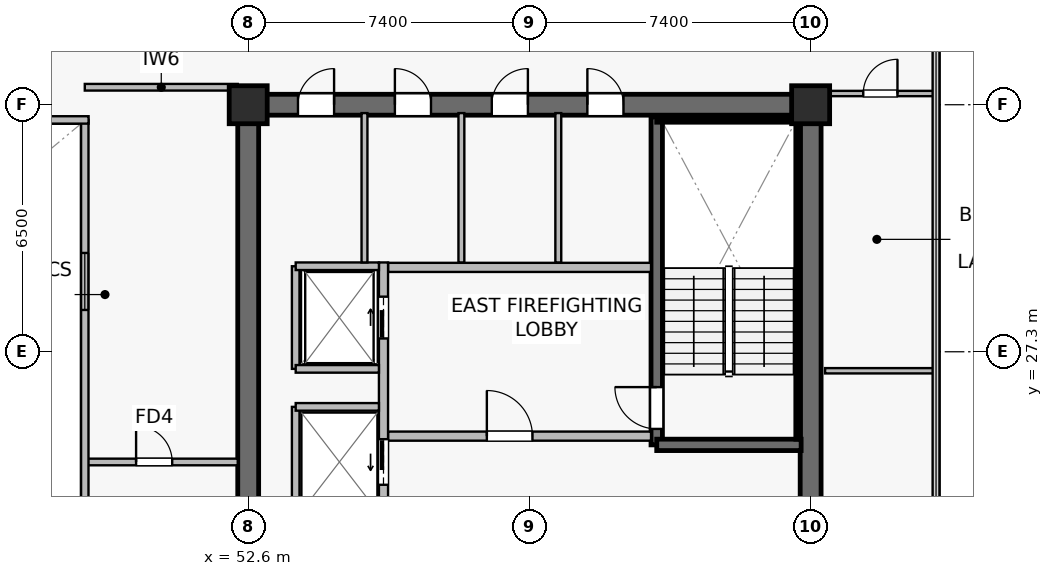
"""IFC4 building model, lengths in metres.
Left out: names, types, materials, properties, quantities, classifications, styles, units other than length and angle.
Written with IfcOpenShell. Run it as: python <this file> out.ifc"""

import sys

from ifc_helpers import new_model, si_unit, direction, frame, frame_2d, origin, origin_2d, place, context, subcontext, project, spatial, rectangle, extrude, source, transform, mapped, element, fill, save


model = new_model("IFC4")
c1 = context("Model", 3, precision=1e-05, world=origin(), true_north=direction((0.0, 1.0)))
c2 = subcontext(c1, "Body", "Model", "MODEL_VIEW")
j1 = project(units=[si_unit("LENGTHUNIT", "METRE"), si_unit("PLANEANGLEUNIT", "RADIAN")], contexts=[c1])
p1 = place(None, origin())
s1 = spatial("IfcSite", under=j1, at=p1, CompositionType="ELEMENT")
p2 = place(p1, origin())
s2 = spatial("IfcBuilding", under=s1, at=p2, CompositionType="ELEMENT")
p3 = place(p2, frame((0.0, 0.0, 258.8)))
s3 = spatial("IfcBuildingStorey", under=s2, at=p3, CompositionType="ELEMENT", Elevation=258.8)
p4 = place(p3, frame((52.325, 33.8, 0.0), z_axis=(0.0, 0.0, 1.0), x_axis=(1.0, 0.0, 0.0)))
e1 = element("IfcWall", 1, at=p4, inside=s3, PredefinedType="SHEAR", context=c2, shape_type="SweptSolid", body=[
    extrude(rectangle(XDim=15.35, YDim=0.55, at=frame_2d((7.675, 0.0))), origin(), (0.0, 0.0, 1.0), 3.8),
])
p5 = place(p4, frame((9.2, 0.0, 0.0)))
e2 = element("IfcOpeningElement", 2, at=p5, cuts=e1, PredefinedType="OPENING", context=c2, shape_type="SweptSolid", body=[
    extrude(rectangle(XDim=0.95, YDim=2.15, at=frame_2d((0.475, 1.075))), frame((0.0, 0.285, 0.0), z_axis=(0.0, -1.0, 0.0), x_axis=(1.0, 0.0, 0.0)), (0.0, 0.0, 1.0), 0.57),
])
p6 = place(p4, frame((6.685, 0.0, 0.0)))
e3 = element("IfcOpeningElement", 3, at=p6, cuts=e1, PredefinedType="OPENING", context=c2, shape_type="SweptSolid", body=[
    extrude(rectangle(XDim=0.95, YDim=2.15, at=frame_2d((0.475, 1.075))), frame((0.0, 0.285, 0.0), z_axis=(0.0, -1.0, 0.0), x_axis=(1.0, 0.0, 0.0)), (0.0, 0.0, 1.0), 0.57),
])
p7 = place(p4, frame((4.135, 0.0, 0.0)))
e4 = element("IfcOpeningElement", 4, at=p7, cuts=e1, PredefinedType="OPENING", context=c2, shape_type="SweptSolid", body=[
    extrude(rectangle(XDim=0.95, YDim=2.15, at=frame_2d((0.475, 1.075))), frame((0.0, 0.285, 0.0), z_axis=(0.0, -1.0, 0.0), x_axis=(1.0, 0.0, 0.0)), (0.0, 0.0, 1.0), 0.57),
])
p8 = place(p4, frame((1.585, 0.0, 0.0)))
e5 = element("IfcOpeningElement", 5, at=p8, cuts=e1, PredefinedType="OPENING", context=c2, shape_type="SweptSolid", body=[
    extrude(rectangle(XDim=0.95, YDim=2.15, at=frame_2d((0.475, 1.075))), frame((0.0, 0.285, 0.0), z_axis=(0.0, -1.0, 0.0), x_axis=(1.0, 0.0, 0.0)), (0.0, 0.0, 1.0), 0.57),
])
p9 = place(p3, frame((52.6, 15.075, 0.0), z_axis=(0.0, 0.0, 1.0), x_axis=(0.0, 1.0, 0.0)))
e6 = element("IfcWall", 6, at=p9, inside=s3, PredefinedType="SHEAR", context=c2, shape_type="SweptSolid", body=[
    extrude(rectangle(XDim=18.45, YDim=0.55, at=frame_2d((9.225, 0.0))), origin(), (0.0, 0.0, 1.0), 3.8),
])
p10 = place(p9, frame((3.475, 0.0, 0.0)))
e7 = element("IfcOpeningElement", 7, at=p10, cuts=e6, PredefinedType="OPENING", context=c2, shape_type="SweptSolid", body=[
    extrude(rectangle(XDim=1.42, YDim=2.2, at=frame_2d((0.71, 1.1))), frame((0.0, 0.285, 0.0), z_axis=(0.0, -1.0, 0.0), x_axis=(1.0, 0.0, 0.0)), (0.0, 0.0, 1.0), 0.57),
])
p11 = place(p3, frame((67.4, 15.075, 0.0), z_axis=(0.0, 0.0, 1.0), x_axis=(0.0, 1.0, 0.0)))
e8 = element("IfcWall", 8, at=p11, inside=s3, PredefinedType="SHEAR", context=c2, shape_type="SweptSolid", body=[
    extrude(rectangle(XDim=18.45, YDim=0.55, at=frame_2d((9.225, 0.0))), origin(), (0.0, 0.0, 1.0), 3.8),
])
p12 = place(p3, frame((63.35, 24.85, 0.0), z_axis=(0.0, 0.0, 1.0), x_axis=(0.0, 1.0, 0.0)))
e9 = element("IfcWall", 9, at=p12, inside=s3, PredefinedType="SHEAR", context=c2, shape_type="SweptSolid", body=[
    extrude(rectangle(XDim=8.63, YDim=0.3, at=frame_2d((4.315, 0.0))), origin(), (0.0, 0.0, 1.0), 3.8),
])
p13 = place(p12, frame((0.42, 0.0, 0.0)))
e10 = element("IfcOpeningElement", 10, at=p13, cuts=e9, PredefinedType="OPENING", context=c2, shape_type="SweptSolid", body=[
    extrude(rectangle(XDim=1.1, YDim=2.15, at=frame_2d((0.55, 1.075))), frame((0.0, 0.16, 0.0), z_axis=(0.0, -1.0, 0.0), x_axis=(1.0, 0.0, 0.0)), (0.0, 0.0, 1.0), 0.32),
])
p14 = place(p3, frame((63.35, 24.85, 0.0), z_axis=(0.0, 0.0, 1.0), x_axis=(1.0, 0.0, 0.0)))
e11 = element("IfcWall", 11, at=p14, inside=s3, PredefinedType="SHEAR", context=c2, shape_type="SweptSolid", body=[
    extrude(rectangle(XDim=3.8, YDim=0.3, at=frame_2d((1.9, 0.0))), origin(), (0.0, 0.0, 1.0), 3.8),
])
p15 = place(p3, frame((63.35, 33.4, 0.0), z_axis=(0.0, 0.0, 1.0), x_axis=(1.0, 0.0, 0.0)))
e12 = element("IfcWall", 12, at=p15, inside=s3, PredefinedType="SOLIDWALL", context=c2, shape_type="SweptSolid", body=[
    extrude(rectangle(XDim=3.72, YDim=0.12, at=frame_2d((1.86, 0.0))), origin(), (0.0, 0.0, 1.0), 3.8),
])
p16 = place(p3, frame((67.07, 25.0, 0.0), z_axis=(0.0, 0.0, 1.0), x_axis=(0.0, 1.0, 0.0)))
e13 = element("IfcWall", 13, at=p16, inside=s3, PredefinedType="SOLIDWALL", context=c2, shape_type="SweptSolid", body=[
    extrude(rectangle(XDim=8.32, YDim=0.12, at=frame_2d((4.16, 0.0))), origin(), (0.0, 0.0, 1.0), 3.8),
])
m1 = source(origin(), c2, "Body", "SweptSolid", [
    extrude(rectangle(XDim=1.0, YDim=1.0, at=origin_2d()), origin(), (0.0, 0.0, 1.0), 4.1),
])
for number, where, z_axis, x_axis in (
    (14, (52.6, 33.8, 0.0), (0.0, 0.0, 1.0), (1.0, 0.0, 0.0)),
    (15, (67.4, 33.8, 0.0), (0.0, 0.0, 1.0), (1.0, 0.0, 0.0)),
):
    element("IfcColumn", number, at=place(p3, frame(where, z_axis=z_axis, x_axis=x_axis)), inside=s3, PredefinedType="COLUMN", context=c2, shape_type="MappedRepresentation", body=[
        mapped(m1, transform((0.0, 0.0, 0.0), scale=1.0)),
    ])
p17 = place(p3, frame((56.28, 25.08, 0.0), z_axis=(0.0, 0.0, 1.0), x_axis=(1.0, 0.0, 0.0)))
e16 = element("IfcWall", 16, at=p17, inside=s3, PredefinedType="SOLIDWALL", context=c2, shape_type="SweptSolid", body=[
    extrude(rectangle(XDim=6.92, YDim=0.24, at=frame_2d((3.46, 0.0))), origin(), (0.0, 0.0, 1.0), 3.197),
])
p18 = place(p17, frame((2.6, 0.0, 0.0)))
e17 = element("IfcOpeningElement", 17, at=p18, cuts=e16, PredefinedType="OPENING", context=c2, shape_type="SweptSolid", body=[
    extrude(rectangle(XDim=1.2, YDim=2.16, at=frame_2d((0.6, 1.08))), frame((0.0, 0.13, 0.0), z_axis=(0.0, -1.0, 0.0), x_axis=(1.0, 0.0, 0.0)), (0.0, 0.0, 1.0), 0.26),
])
p19 = place(p3, frame((56.28, 29.52, 0.0), z_axis=(0.0, 0.0, 1.0), x_axis=(1.0, 0.0, 0.0)))
e18 = element("IfcWall", 18, at=p19, inside=s3, PredefinedType="SOLIDWALL", context=c2, shape_type="SweptSolid", body=[
    extrude(rectangle(XDim=6.92, YDim=0.24, at=frame_2d((3.46, 0.0))), origin(), (0.0, 0.0, 1.0), 3.197),
])
p20 = place(p3, frame((56.16, 22.8, 0.0), z_axis=(0.0, 0.0, 1.0), x_axis=(0.0, 1.0, 0.0)))
e19 = element("IfcWall", 19, at=p20, inside=s3, PredefinedType="SOLIDWALL", context=c2, shape_type="SweptSolid", body=[
    extrude(rectangle(XDim=6.85, YDim=0.24, at=frame_2d((3.425, 0.0))), origin(), (0.0, 0.0, 1.0), 2.935),
])
p21 = place(p20, frame((4.85, 0.0, 0.0)))
e20 = element("IfcOpeningElement", 20, at=p21, cuts=e19, PredefinedType="OPENING", context=c2, shape_type="SweptSolid", body=[
    extrude(rectangle(XDim=1.1, YDim=2.22, at=frame_2d((0.55, 1.11))), frame((0.0, 0.13, 0.0), z_axis=(0.0, -1.0, 0.0), x_axis=(1.0, 0.0, 0.0)), (0.0, 0.0, 1.0), 0.26),
])
p22 = place(p20, frame((1.0, 0.0, 0.0)))
e21 = element("IfcOpeningElement", 21, at=p22, cuts=e19, PredefinedType="OPENING", context=c2, shape_type="SweptSolid", body=[
    extrude(rectangle(XDim=1.2, YDim=2.22, at=frame_2d((0.6, 1.11))), frame((0.0, 0.13, 0.0), z_axis=(0.0, -1.0, 0.0), x_axis=(1.0, 0.0, 0.0)), (0.0, 0.0, 1.0), 0.26),
])
p23 = place(p3, frame((53.85, 26.85, 0.0), z_axis=(0.0, 0.0, 1.0), x_axis=(0.0, 1.0, 0.0)))
e22 = element("IfcWall", 22, at=p23, inside=s3, PredefinedType="SOLIDWALL", context=c2, shape_type="SweptSolid", body=[
    extrude(rectangle(XDim=2.7, YDim=0.2, at=frame_2d((1.35, 0.0))), origin(), (0.0, 0.0, 1.0), 3.8),
])
p24 = place(p3, frame((53.85, 29.55, 0.0), z_axis=(0.0, 0.0, 1.0), x_axis=(1.0, 0.0, 0.0)))
e23 = element("IfcWall", 23, at=p24, inside=s3, PredefinedType="SOLIDWALL", context=c2, shape_type="SweptSolid", body=[
    extrude(rectangle(XDim=2.19, YDim=0.2, at=frame_2d((1.095, 0.0))), origin(), (0.0, 0.0, 1.0), 3.8),
])
p25 = place(p3, frame((53.85, 26.85, 0.0), z_axis=(0.0, 0.0, 1.0), x_axis=(1.0, 0.0, 0.0)))
e24 = element("IfcWall", 24, at=p25, inside=s3, PredefinedType="SOLIDWALL", context=c2, shape_type="SweptSolid", body=[
    extrude(rectangle(XDim=2.19, YDim=0.2, at=frame_2d((1.095, 0.0))), origin(), (0.0, 0.0, 1.0), 3.197),
])
p26 = place(p3, frame((53.85, 22.95, 0.0), z_axis=(0.0, 0.0, 1.0), x_axis=(0.0, 1.0, 0.0)))
e25 = element("IfcWall", 25, at=p26, inside=s3, PredefinedType="SOLIDWALL", context=c2, shape_type="SweptSolid", body=[
    extrude(rectangle(XDim=2.9, YDim=0.2, at=frame_2d((1.45, 0.0))), origin(), (0.0, 0.0, 1.0), 2.935),
])
p27 = place(p3, frame((53.85, 25.85, 0.0), z_axis=(0.0, 0.0, 1.0), x_axis=(1.0, 0.0, 0.0)))
e26 = element("IfcWall", 26, at=p27, inside=s3, PredefinedType="SOLIDWALL", context=c2, shape_type="SweptSolid", body=[
    extrude(rectangle(XDim=2.19, YDim=0.2, at=frame_2d((1.095, 0.0))), origin(), (0.0, 0.0, 1.0), 3.8),
])
for number, where, z_axis, x_axis in (
    (27, (60.76, 29.65, 0.0), (0.0, 0.0, 1.0), (0.0, 1.0, 0.0)),
    (28, (58.21, 29.65, 0.0), (0.0, 0.0, 1.0), (0.0, 1.0, 0.0)),
    (29, (55.66, 29.65, 0.0), (0.0, 0.0, 1.0), (0.0, 1.0, 0.0)),
):
    element("IfcWall", number, at=place(p3, frame(where, z_axis=z_axis, x_axis=x_axis)), inside=s3, PredefinedType="PLUMBINGWALL", context=c2, shape_type="SweptSolid", body=[
        extrude(rectangle(XDim=3.93, YDim=0.155, at=frame_2d((1.965, 0.0))), origin(), (0.0, 0.0, 1.0), 3.8),
    ])
p28 = place(p3, frame((48.3, 34.26, 0.0), z_axis=(0.0, 0.0, 1.0), x_axis=(1.0, 0.0, 0.0)))
e30 = element("IfcWall", 30, at=p28, inside=s3, PredefinedType="PARTITIONING", context=c2, shape_type="SweptSolid", body=[
    extrude(rectangle(XDim=4.025, YDim=0.175, at=frame_2d((2.012, 0.0))), origin(), (0.0, 0.0, 1.0), 3.535),
])
p29 = place(p3, frame((48.3, 24.4, 0.0), z_axis=(0.0, 0.0, 1.0), x_axis=(1.0, 0.0, 0.0)))
e31 = element("IfcWall", 31, at=p29, inside=s3, PredefinedType="PARTITIONING", context=c2, shape_type="SweptSolid", body=[
    extrude(rectangle(XDim=4.025, YDim=0.175, at=frame_2d((2.012, 0.0))), origin(), (0.0, 0.0, 1.0), 3.8),
])
p30 = place(p29, frame((1.35, 0.0, 0.0)))
e32 = element("IfcOpeningElement", 32, at=p30, cuts=e31, PredefinedType="OPENING", context=c2, shape_type="SweptSolid", body=[
    extrude(rectangle(XDim=0.95, YDim=2.15, at=frame_2d((0.475, 1.075))), frame((0.0, 0.098, 0.0), z_axis=(0.0, -1.0, 0.0), x_axis=(1.0, 0.0, 0.0)), (0.0, 0.0, 1.0), 0.195),
])
p31 = place(p3, frame((48.3, 15.2, 0.0), z_axis=(0.0, 0.0, 1.0), x_axis=(0.0, 1.0, 0.0)))
e33 = element("IfcWall", 33, at=p31, inside=s3, PredefinedType="SOLIDWALL", context=c2, shape_type="SweptSolid", body=[
    extrude(rectangle(XDim=18.2, YDim=0.195, at=frame_2d((9.1, 0.0))), origin(), (0.0, 0.0, 1.0), 3.8),
])
p32 = place(p31, frame((1.8, 0.0, 0.9)))
e34 = element("IfcOpeningElement", 34, at=p32, cuts=e33, PredefinedType="OPENING", context=c2, shape_type="SweptSolid", body=[
    extrude(rectangle(XDim=1.5, YDim=1.4, at=frame_2d((0.75, 0.7))), frame((0.0, 0.107, 0.0), z_axis=(0.0, -1.0, 0.0), x_axis=(1.0, 0.0, 0.0)), (0.0, 0.0, 1.0), 0.215),
])
p33 = place(p31, frame((13.2, 0.0, 0.9)))
e35 = element("IfcOpeningElement", 35, at=p33, cuts=e33, PredefinedType="OPENING", context=c2, shape_type="SweptSolid", body=[
    extrude(rectangle(XDim=1.5, YDim=1.4, at=frame_2d((0.75, 0.7))), frame((0.0, 0.107, 0.0), z_axis=(0.0, -1.0, 0.0), x_axis=(1.0, 0.0, 0.0)), (0.0, 0.0, 1.0), 0.215),
])
p34 = place(p3, frame((26.4, 33.4, 0.0), z_axis=(0.0, 0.0, 1.0), x_axis=(1.0, 0.0, 0.0)))
e36 = element("IfcWall", 36, at=p34, inside=s3, PredefinedType="SOLIDWALL", context=c2, shape_type="SweptSolid", body=[
    extrude(rectangle(XDim=22.0, YDim=0.195, at=frame_2d((11.0, 0.0))), origin(), (0.0, 0.0, 1.0), 3.8),
])
p35 = place(p3, frame((67.78, 26.8, 0.0), z_axis=(0.0, 0.0, 1.0), x_axis=(1.0, 0.0, 0.0)))
e37 = element("IfcWall", 37, at=p35, inside=s3, PredefinedType="PARTITIONING", context=c2, shape_type="SweptSolid", body=[
    extrude(rectangle(XDim=2.91, YDim=0.14, at=frame_2d((1.455, 0.0))), origin(), (0.0, 0.0, 1.0), 3.8),
])
p36 = place(p3, frame((67.78, 34.095, 0.0), z_axis=(0.0, 0.0, 1.0), x_axis=(1.0, 0.0, 0.0)))
e38 = element("IfcWall", 38, at=p36, inside=s3, PredefinedType="PARTITIONING", context=c2, shape_type="SweptSolid", body=[
    extrude(rectangle(XDim=2.91, YDim=0.14, at=frame_2d((1.455, 0.0))), origin(), (0.0, 0.0, 1.0), 3.8),
])
p37 = place(p36, frame((1.005, 0.0, 0.0)))
e39 = element("IfcOpeningElement", 39, at=p37, cuts=e38, PredefinedType="OPENING", context=c2, shape_type="SweptSolid", body=[
    extrude(rectangle(XDim=0.9, YDim=2.1, at=frame_2d((0.45, 1.05))), frame((0.0, 0.08, 0.0), z_axis=(0.0, -1.0, 0.0), x_axis=(1.0, 0.0, 0.0)), (0.0, 0.0, 1.0), 0.16),
])
m2 = source(origin(), c2, "Body", "SweptSolid", [
    extrude(rectangle(XDim=1.5, YDim=1.4, at=frame_2d((0.75, 0.7))), frame((0.0, 0.03, 0.0), z_axis=(0.0, -1.0, 0.0), x_axis=(1.0, 0.0, 0.0)), (0.0, 0.0, 1.0), 0.06),
])
p38 = place(p33, origin())
e40 = element("IfcWindow", 40, at=p38, inside=s3, PartitioningType="SINGLE_PANEL", PredefinedType="WINDOW", context=c2, shape_type="MappedRepresentation", body=[
    mapped(m2, transform((0.0, 0.0, 0.0), scale=1.0)),
])
fill(e35, e40)
m3 = source(origin(), c2, "Body", "SweptSolid", [
    extrude(rectangle(XDim=1.1, YDim=2.15, at=frame_2d((0.55, 1.075))), frame((0.0, 0.025, 0.0), z_axis=(0.0, -1.0, 0.0), x_axis=(1.0, 0.0, 0.0)), (0.0, 0.0, 1.0), 0.05),
])
p39 = place(p13, origin())
e41 = element("IfcDoor", 41, at=p39, inside=s3, OperationType="SINGLE_SWING_RIGHT", PredefinedType="DOOR", context=c2, shape_type="MappedRepresentation", body=[
    mapped(m3, transform((0.0, 0.0, 0.0), scale=1.0)),
])
fill(e10, e41)
m4 = source(origin(), c2, "Body", "SweptSolid", [
    extrude(rectangle(XDim=1.2, YDim=2.16, at=frame_2d((0.6, 1.08))), frame((0.0, 0.025, 0.0), z_axis=(0.0, -1.0, 0.0), x_axis=(1.0, 0.0, 0.0)), (0.0, 0.0, 1.0), 0.05),
])
p40 = place(p18, origin())
e42 = element("IfcDoor", 42, at=p40, inside=s3, OperationType="SINGLE_SWING_LEFT", PredefinedType="DOOR", context=c2, shape_type="MappedRepresentation", body=[
    mapped(m4, transform((0.0, 0.0, 0.0), scale=1.0)),
])
fill(e17, e42)
m5 = source(origin(), c2, "Body", "SweptSolid", [
    extrude(rectangle(XDim=1.1, YDim=2.22, at=frame_2d((0.55, 1.11))), frame((0.0, 0.025, 0.0), z_axis=(0.0, -1.0, 0.0), x_axis=(1.0, 0.0, 0.0)), (0.0, 0.0, 1.0), 0.05),
])
p41 = place(p21, origin())
e43 = element("IfcDoor", 43, at=p41, inside=s3, OperationType="SLIDING_TO_RIGHT", PredefinedType="USERDEFINED", context=c2, shape_type="MappedRepresentation", body=[
    mapped(m5, transform((0.0, 0.0, 0.0), scale=1.0)),
])
fill(e20, e43)
m6 = source(origin(), c2, "Body", "SweptSolid", [
    extrude(rectangle(XDim=1.2, YDim=2.22, at=frame_2d((0.6, 1.11))), frame((0.0, 0.025, 0.0), z_axis=(0.0, -1.0, 0.0), x_axis=(1.0, 0.0, 0.0)), (0.0, 0.0, 1.0), 0.05),
])
p42 = place(p22, origin())
e44 = element("IfcDoor", 44, at=p42, inside=s3, OperationType="SLIDING_TO_LEFT", PredefinedType="USERDEFINED", context=c2, shape_type="MappedRepresentation", body=[
    mapped(m6, transform((0.0, 0.0, 0.0), scale=1.0)),
])
fill(e21, e44)
m7 = source(origin(), c2, "Body", "SweptSolid", [
    extrude(rectangle(XDim=0.95, YDim=2.15, at=frame_2d((0.475, 1.075))), frame((0.0, 0.025, 0.0), z_axis=(0.0, -1.0, 0.0), x_axis=(1.0, 0.0, 0.0)), (0.0, 0.0, 1.0), 0.05),
])
p43 = place(p5, origin())
e45 = element("IfcDoor", 45, at=p43, inside=s3, OperationType="SINGLE_SWING_LEFT", PredefinedType="DOOR", context=c2, shape_type="MappedRepresentation", body=[
    mapped(m7, transform((0.0, 0.0, 0.0), scale=1.0)),
])
fill(e2, e45)
p44 = place(p6, origin())
e46 = element("IfcDoor", 46, at=p44, inside=s3, OperationType="SINGLE_SWING_RIGHT", PredefinedType="DOOR", context=c2, shape_type="MappedRepresentation", body=[
    mapped(m7, transform((0.0, 0.0, 0.0), scale=1.0)),
])
fill(e3, e46)
p45 = place(p7, origin())
e47 = element("IfcDoor", 47, at=p45, inside=s3, OperationType="SINGLE_SWING_LEFT", PredefinedType="DOOR", context=c2, shape_type="MappedRepresentation", body=[
    mapped(m7, transform((0.0, 0.0, 0.0), scale=1.0)),
])
fill(e4, e47)
p46 = place(p8, origin())
e48 = element("IfcDoor", 48, at=p46, inside=s3, OperationType="SINGLE_SWING_RIGHT", PredefinedType="DOOR", context=c2, shape_type="MappedRepresentation", body=[
    mapped(m7, transform((0.0, 0.0, 0.0), scale=1.0)),
])
fill(e5, e48)
p47 = place(p30, origin())
e49 = element("IfcDoor", 49, at=p47, inside=s3, OperationType="SINGLE_SWING_LEFT", PredefinedType="DOOR", context=c2, shape_type="MappedRepresentation", body=[
    mapped(m7, transform((0.0, 0.0, 0.0), scale=1.0)),
])
fill(e32, e49)
m8 = source(origin(), c2, "Body", "SweptSolid", [
    extrude(rectangle(XDim=0.9, YDim=2.1, at=frame_2d((0.45, 1.05))), frame((0.0, 0.025, 0.0), z_axis=(0.0, -1.0, 0.0), x_axis=(1.0, 0.0, 0.0)), (0.0, 0.0, 1.0), 0.05),
])
p48 = place(p37, origin())
e50 = element("IfcDoor", 50, at=p48, inside=s3, OperationType="SINGLE_SWING_RIGHT", PredefinedType="DOOR", context=c2, shape_type="MappedRepresentation", body=[
    mapped(m8, transform((0.0, 0.0, 0.0), scale=1.0)),
])
fill(e39, e50)
save(model, sys.argv[1])
